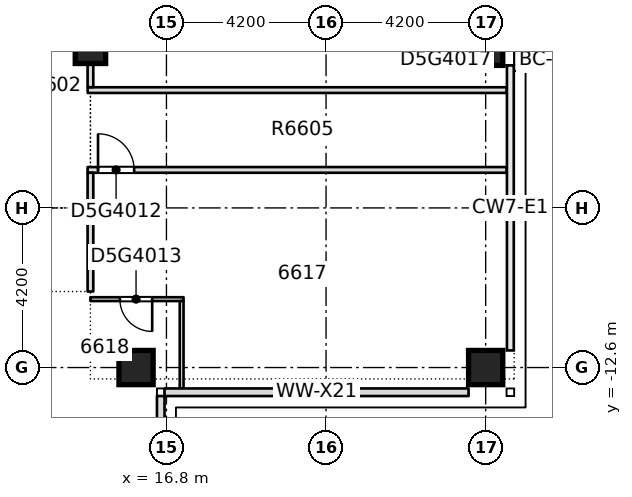
"""IFC4 building model, lengths in metres.
Left out: names, types, materials, properties, quantities, classifications, styles, units other than length and angle.
Written with IfcOpenShell. Run it as: python <this file> out.ifc"""

import sys

from ifc_helpers import new_model, si_unit, direction, frame, frame_2d, origin, origin_2d, place, context, subcontext, project, spatial, rectangle, extrude, element, fill, save


model = new_model("IFC4")
c1 = context("Model", 3, precision=1e-05, world=origin(), true_north=direction((0.0, 1.0)))
c2 = subcontext(c1, "Body", "Model", "MODEL_VIEW")
j1 = project(units=[si_unit("LENGTHUNIT", "METRE"), si_unit("PLANEANGLEUNIT", "RADIAN")], contexts=[c1])
p1 = place(None, origin())
s1 = spatial("IfcSite", under=j1, at=p1, CompositionType="ELEMENT")
p2 = place(p1, origin())
s2 = spatial("IfcBuilding", under=s1, at=p2, CompositionType="ELEMENT")
p3 = place(p2, frame((0.0, 0.0, 251.05)))
s3 = spatial("IfcBuildingStorey", under=s2, at=p3, CompositionType="ELEMENT", Elevation=251.05)
for number, where, z_axis, x_axis in (
    (1, (16.0, -12.6, -0.4), (0.0, 0.0, 1.0), (1.0, 0.0, 0.0)),
    (2, (25.2, -12.6, -0.4), (0.0, 0.0, 1.0), (1.0, 0.0, 0.0)),
    (3, (25.2, -4.2, -0.4), (0.0, 0.0, 1.0), (1.0, 0.0, 0.0)),
):
    element("IfcColumn", number, at=place(p3, frame(where, z_axis=z_axis, x_axis=x_axis)), inside=s3, PredefinedType="COLUMN", context=c2, shape_type="SweptSolid", body=[
        extrude(rectangle(XDim=0.9, YDim=0.9, at=origin_2d()), origin(), (0.0, 0.0, 1.0), 3.45),
    ])
p4 = place(p3, frame((14.8, -4.2, -0.4), z_axis=(0.0, 0.0, 1.0), x_axis=(1.0, 0.0, 0.0)))
e4 = element("IfcColumn", 4, at=p4, inside=s3, PredefinedType="COLUMN", context=c2, shape_type="SweptSolid", body=[
    extrude(rectangle(XDim=0.8, YDim=0.8, at=origin_2d()), origin(), (0.0, 0.0, 1.0), 3.45),
])
p5 = place(p3, frame((14.8, -10.8, 0.0), z_axis=(0.0, 0.0, 1.0), x_axis=(1.0, 0.0, 0.0)))
e5 = element("IfcWall", 5, at=p5, inside=s3, PredefinedType="PARTITIONING", context=c2, shape_type="SweptSolid", body=[
    extrude(rectangle(XDim=2.45, YDim=0.1, at=frame_2d((1.225, 0.0))), origin(), (0.0, 0.0, 1.0), 3.05),
])
p6 = place(p5, frame((0.775, 0.0, 0.0)))
e6 = element("IfcOpeningElement", 6, at=p6, cuts=e5, PredefinedType="OPENING", context=c2, shape_type="SweptSolid", body=[
    extrude(rectangle(XDim=0.85, YDim=2.1, at=frame_2d((0.425, 1.05))), frame((0.0, 0.06, 0.0), z_axis=(0.0, -1.0, 0.0), x_axis=(1.0, 0.0, 0.0)), (0.0, 0.0, 1.0), 0.12),
])
p7 = place(p3, frame((14.725, -7.4, 0.0), z_axis=(0.0, 0.0, 1.0), x_axis=(1.0, 0.0, 0.0)))
e7 = element("IfcWall", 7, at=p7, inside=s3, PredefinedType="PARTITIONING", context=c2, shape_type="SweptSolid", body=[
    extrude(rectangle(XDim=11.025, YDim=0.15, at=frame_2d((5.512, 0.0))), origin(), (0.0, 0.0, 1.0), 3.05),
])
p8 = place(p7, frame((0.275, 0.0, 0.0)))
e8 = element("IfcOpeningElement", 8, at=p8, cuts=e7, PredefinedType="OPENING", context=c2, shape_type="SweptSolid", body=[
    extrude(rectangle(XDim=0.95, YDim=2.1, at=frame_2d((0.475, 1.05))), frame((0.0, 0.085, 0.0), z_axis=(0.0, -1.0, 0.0), x_axis=(1.0, 0.0, 0.0)), (0.0, 0.0, 1.0), 0.17),
])
p9 = place(p3, frame((14.727, -5.3, 0.0), z_axis=(0.0, 0.0, 1.0), x_axis=(1.0, 0.0, 0.0)))
e9 = element("IfcWall", 9, at=p9, inside=s3, PredefinedType="PARTITIONING", context=c2, shape_type="SweptSolid", body=[
    extrude(rectangle(XDim=11.023, YDim=0.15, at=frame_2d((5.511, 0.0))), origin(), (0.0, 0.0, 1.0), 3.05),
])
p10 = place(p3, frame((14.8, -10.6, 0.0), z_axis=(0.0, 0.0, 1.0), x_axis=(0.0, 1.0, 0.0)))
e10 = element("IfcWall", 10, at=p10, inside=s3, PredefinedType="PARTITIONING", context=c2, shape_type="SweptSolid", body=[
    extrude(rectangle(XDim=3.125, YDim=0.15, at=frame_2d((1.562, 0.0))), origin(), (0.0, 0.0, 1.0), 3.05),
])
p11 = place(p3, frame((14.8, -5.223, 0.0), z_axis=(0.0, 0.0, 1.0), x_axis=(0.0, 1.0, 0.0)))
e11 = element("IfcWall", 11, at=p11, inside=s3, PredefinedType="PARTITIONING", context=c2, shape_type="SweptSolid", body=[
    extrude(rectangle(XDim=18.523, YDim=0.15, at=frame_2d((9.261, 0.0))), origin(), (0.0, 0.0, 1.0), 3.05),
])
p12 = place(p11, frame((13.098, 0.0, 0.0)))
e12 = element("IfcOpeningElement", 12, at=p12, cuts=e11, PredefinedType="OPENING", context=c2, shape_type="SweptSolid", body=[
    extrude(rectangle(XDim=1.0, YDim=2.1, at=frame_2d((0.5, 1.05))), frame((0.0, 0.085, 0.0), z_axis=(0.0, -1.0, 0.0), x_axis=(1.0, 0.0, 0.0)), (0.0, 0.0, 1.0), 0.17),
])
p13 = place(p11, frame((4.673, 0.0, 0.0)))
e13 = element("IfcOpeningElement", 13, at=p13, cuts=e11, PredefinedType="OPENING", context=c2, shape_type="SweptSolid", body=[
    extrude(rectangle(XDim=1.1, YDim=2.1, at=frame_2d((0.55, 1.05))), frame((0.0, 0.085, 0.0), z_axis=(0.0, -1.0, 0.0), x_axis=(1.0, 0.0, 0.0)), (0.0, 0.0, 1.0), 0.17),
])
p14 = place(p3, frame((17.2, -13.15, 0.0), z_axis=(0.0, 0.0, 1.0), x_axis=(0.0, 1.0, 0.0)))
e14 = element("IfcWall", 14, at=p14, inside=s3, PredefinedType="PARTITIONING", context=c2, shape_type="SweptSolid", body=[
    extrude(rectangle(XDim=2.3, YDim=0.1, at=frame_2d((1.15, 0.0))), origin(), (0.0, 0.0, 1.0), 3.05),
])
p15 = place(p3, frame((16.65, -20.55, 0.0), z_axis=(0.0, 0.0, 1.0), x_axis=(0.0, 1.0, 0.0)))
e15 = element("IfcWall", 15, at=p15, inside=s3, PredefinedType="STANDARD", context=c2, shape_type="SweptSolid", body=[
    extrude(rectangle(XDim=7.2, YDim=0.2, at=frame_2d((3.6, 0.0))), origin(), (0.0, 0.0, 1.0), 3.05),
])
p16 = place(p15, frame((0.425, 0.0, 0.2)))
e16 = element("IfcOpeningElement", 16, at=p16, cuts=e15, PredefinedType="OPENING", context=c2, shape_type="SweptSolid", body=[
    extrude(rectangle(XDim=1.8, YDim=2.65, at=frame_2d((0.9, 1.325))), frame((0.0, 0.11, 0.0), z_axis=(0.0, -1.0, 0.0), x_axis=(1.0, 0.0, 0.0)), (0.0, 0.0, 1.0), 0.22),
])
p17 = place(p15, frame((4.025, 0.0, 0.2)))
e17 = element("IfcOpeningElement", 17, at=p17, cuts=e15, PredefinedType="OPENING", context=c2, shape_type="SweptSolid", body=[
    extrude(rectangle(XDim=1.8, YDim=2.65, at=frame_2d((0.9, 1.325))), frame((0.0, 0.11, 0.0), z_axis=(0.0, -1.0, 0.0), x_axis=(1.0, 0.0, 0.0)), (0.0, 0.0, 1.0), 0.22),
])
p18 = place(p3, frame((16.75, -13.25, 0.0), z_axis=(0.0, 0.0, 1.0), x_axis=(1.0, 0.0, 0.0)))
e18 = element("IfcWall", 18, at=p18, inside=s3, PredefinedType="STANDARD", context=c2, shape_type="SweptSolid", body=[
    extrude(rectangle(XDim=8.0, YDim=0.2, at=frame_2d((4.0, 0.0))), origin(), (0.0, 0.0, 1.0), 3.05),
])
p19 = place(p8, origin())
e19 = element("IfcDoor", 19, at=p19, inside=s3, OperationType="SINGLE_SWING_RIGHT", PredefinedType="DOOR", context=c2, shape_type="SweptSolid", body=[
    extrude(rectangle(XDim=0.95, YDim=2.1, at=frame_2d((0.475, 1.05))), frame((0.0, 0.025, 0.0), z_axis=(0.0, -1.0, 0.0), x_axis=(1.0, 0.0, 0.0)), (0.0, 0.0, 1.0), 0.05),
])
fill(e8, e19)
p20 = place(p6, origin())
e20 = element("IfcDoor", 20, at=p20, inside=s3, OperationType="SINGLE_SWING_RIGHT", PredefinedType="DOOR", context=c2, shape_type="SweptSolid", body=[
    extrude(rectangle(XDim=0.85, YDim=2.1, at=frame_2d((0.425, 1.05))), frame((0.0, 0.025, 0.0), z_axis=(0.0, -1.0, 0.0), x_axis=(1.0, 0.0, 0.0)), (0.0, 0.0, 1.0), 0.05),
])
fill(e6, e20)
save(model, sys.argv[1])
